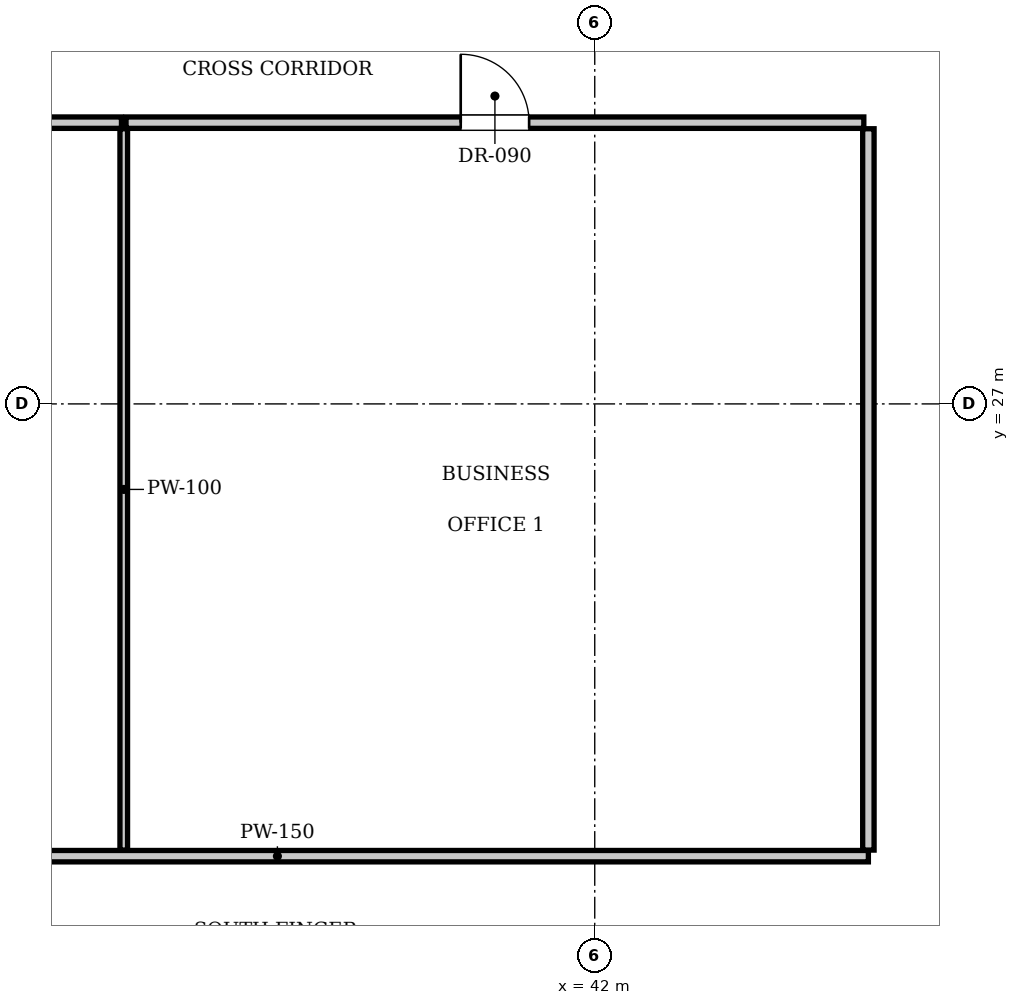
"""IFC4 building model, lengths in metres.
Left out: names, types, materials, properties, quantities, classifications, styles, units other than length and angle.
Written with IfcOpenShell. Run it as: python <this file> out.ifc"""

import sys

from ifc_helpers import new_model, si_unit, direction, frame, frame_2d, origin, place, context, subcontext, project, spatial, rectangle, extrude, element, fill, save


model = new_model("IFC4")
c1 = context("Model", 3, precision=1e-05, world=origin(), true_north=direction((0.0, 1.0)))
c2 = subcontext(c1, "Body", "Model", "MODEL_VIEW")
j1 = project(units=[si_unit("LENGTHUNIT", "METRE"), si_unit("PLANEANGLEUNIT", "RADIAN")], contexts=[c1])
p1 = place(None, origin())
s1 = spatial("IfcSite", under=j1, at=p1, CompositionType="ELEMENT")
p2 = place(p1, origin())
s2 = spatial("IfcBuilding", under=s1, at=p2, CompositionType="ELEMENT")
p3 = place(p2, frame((0.0, 0.0, 239.4)))
s3 = spatial("IfcBuildingStorey", under=s2, at=p3, CompositionType="ELEMENT", Elevation=239.4)
p4 = place(p3, frame((30.05, 21.05, 0.0), z_axis=(0.0, 0.0, 1.0), x_axis=(1.0, 0.0, 0.0)))
e1 = element("IfcWall", 1, at=p4, inside=s3, PredefinedType="PARTITIONING", context=c2, shape_type="SweptSolid", body=[
    extrude(rectangle(XDim=15.55, YDim=0.15, at=frame_2d((7.775, 0.0))), origin(), (0.0, 0.0, 1.0), 3.61),
])
p5 = place(p3, frame((45.6, 21.13, 0.0), z_axis=(0.0, 0.0, 1.0), x_axis=(0.0, 1.0, 0.0)))
e2 = element("IfcWall", 2, at=p5, inside=s3, PredefinedType="PARTITIONING", context=c2, shape_type="SweptSolid", body=[
    extrude(rectangle(XDim=9.49, YDim=0.15, at=frame_2d((4.745, 0.0))), origin(), (0.0, 0.0, 1.0), 3.61),
])
p6 = place(p3, frame((30.11, 30.7, 0.0), z_axis=(0.0, 0.0, 1.0), x_axis=(1.0, 0.0, 0.0)))
e3 = element("IfcWall", 3, at=p6, inside=s3, PredefinedType="PARTITIONING", context=c2, shape_type="SweptSolid", body=[
    extrude(rectangle(XDim=5.663, YDim=0.15, at=frame_2d((2.832, 0.0))), origin(), (0.0, 0.0, 1.0), 3.61),
])
p7 = place(p6, frame((2.382, 0.0, 0.0)))
e4 = element("IfcOpeningElement", 4, at=p7, cuts=e3, PredefinedType="OPENING", context=c2, shape_type="SweptSolid", body=[
    extrude(rectangle(XDim=0.9, YDim=2.1, at=frame_2d((0.45, 1.05))), frame((0.0, 0.085, 0.0), z_axis=(0.0, -1.0, 0.0), x_axis=(1.0, 0.0, 0.0)), (0.0, 0.0, 1.0), 0.17),
])
p8 = place(p3, frame((35.803, 21.13, 0.0), z_axis=(0.0, 0.0, 1.0), x_axis=(0.0, 1.0, 0.0)))
e5 = element("IfcWall", 5, at=p8, inside=s3, PredefinedType="PARTITIONING", context=c2, shape_type="SweptSolid", body=[
    extrude(rectangle(XDim=9.49, YDim=0.1, at=frame_2d((4.745, 0.0))), origin(), (0.0, 0.0, 1.0), 3.61),
])
p9 = place(p3, frame((35.833, 30.7, 0.0), z_axis=(0.0, 0.0, 1.0), x_axis=(1.0, 0.0, 0.0)))
e6 = element("IfcWall", 6, at=p9, inside=s3, PredefinedType="PARTITIONING", context=c2, shape_type="SweptSolid", body=[
    extrude(rectangle(XDim=9.707, YDim=0.15, at=frame_2d((4.853, 0.0))), origin(), (0.0, 0.0, 1.0), 3.61),
])
p10 = place(p9, frame((4.403, 0.0, 0.0)))
e7 = element("IfcOpeningElement", 7, at=p10, cuts=e6, PredefinedType="OPENING", context=c2, shape_type="SweptSolid", body=[
    extrude(rectangle(XDim=0.9, YDim=2.1, at=frame_2d((0.45, 1.05))), frame((0.0, 0.085, 0.0), z_axis=(0.0, -1.0, 0.0), x_axis=(1.0, 0.0, 0.0)), (0.0, 0.0, 1.0), 0.17),
])
p11 = place(p10, origin())
e8 = element("IfcDoor", 8, at=p11, inside=s3, OperationType="SINGLE_SWING_LEFT", PredefinedType="DOOR", context=c2, shape_type="SweptSolid", body=[
    extrude(rectangle(XDim=0.9, YDim=2.1, at=frame_2d((0.45, 1.05))), frame((0.0, 0.025, 0.0), z_axis=(0.0, -1.0, 0.0), x_axis=(1.0, 0.0, 0.0)), (0.0, 0.0, 1.0), 0.05),
])
fill(e7, e8)
save(model, sys.argv[1])
